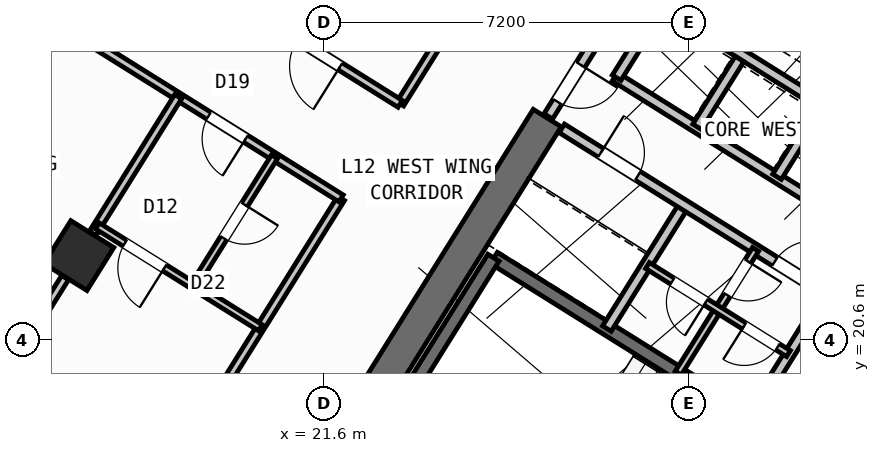
"""IFC4 building model, lengths in metres.
Left out: names, types, materials, properties, quantities, classifications, styles, units other than length and angle.
Written with IfcOpenShell. Run it as: python <this file> out.ifc"""

import sys

from ifc_helpers import new_model, si_unit, direction, frame, frame_2d, origin, origin_2d, place, context, subcontext, project, spatial, rectangle, hollow_rectangle, extrude, source, transform, mapped, element, fill, save


model = new_model("IFC4")
c1 = context("Model", 3, precision=1e-05, world=origin(), true_north=direction((0.0, 1.0)))
c2 = subcontext(c1, "Body", "Model", "MODEL_VIEW")
j1 = project(units=[si_unit("LENGTHUNIT", "METRE"), si_unit("PLANEANGLEUNIT", "RADIAN")], contexts=[c1])
p1 = place(None, origin())
s1 = spatial("IfcSite", under=j1, at=p1, CompositionType="ELEMENT")
p2 = place(p1, origin())
s2 = spatial("IfcBuilding", under=s1, at=p2, CompositionType="ELEMENT")
p3 = place(p2, frame((0.0, 0.0, 49.2)))
s3 = spatial("IfcBuildingStorey", under=s2, at=p3, CompositionType="ELEMENT", Elevation=49.2)
p4 = place(p3, frame((40.615, 23.983, 0.0), z_axis=(0.0, 0.0, 1.0), x_axis=(-0.848045953968, 0.529922692436, 0.0)))
e1 = element("IfcWall", 1, at=p4, inside=s3, PredefinedType="SHEAR", context=c2, shape_type="SweptSolid", body=[
    extrude(rectangle(XDim=13.24, YDim=0.65, at=frame_2d((6.62, 0.0))), origin(), (0.0, 0.0, 1.0), 3.35),
])
p5 = place(p3, frame((26.007, 24.976, 0.0), z_axis=(0.0, 0.0, 1.0), x_axis=(-0.529916319127, -0.848049936456, 0.0)))
e2 = element("IfcWall", 2, at=p5, inside=s3, PredefinedType="SHEAR", context=c2, shape_type="SweptSolid", body=[
    extrude(rectangle(XDim=6.375, YDim=0.65, at=frame_2d((3.188, 0.0))), origin(), (0.0, 0.0, 1.0), 3.35),
])
m1 = source(origin(), c2, "Body", "SweptSolid", [
    extrude(hollow_rectangle(XDim=1.0, YDim=1.0, WallThickness=0.04, at=origin_2d()), origin(), (0.0, 0.0, 1.0), 3.6),
])
p6 = place(p3, frame((16.764, 22.261, 0.0), z_axis=(0.0, 0.0, 1.0), x_axis=(-0.848048096156, 0.529919264233, 0.0)))
e3 = element("IfcColumn", 3, at=p6, inside=s3, PredefinedType="COLUMN", context=c2, shape_type="MappedRepresentation", body=[
    mapped(m1, transform((0.0, 0.0, 0.0), scale=1.0)),
])
p7 = place(p3, frame((29.268, 6.429, 0.0), z_axis=(0.0, 0.0, 1.0), x_axis=(-0.848049971435, 0.529916263149, 0.0)))
e4 = element("IfcWall", 4, at=p7, inside=s3, PredefinedType="STANDARD", context=c2, shape_type="SweptSolid", body=[
    extrude(rectangle(XDim=31.588, YDim=0.32, at=frame_2d((15.794, 0.0))), origin(), (0.0, 0.0, 1.0), 3.35),
])
p8 = place(p7, frame((16.362, 0.0, 0.0)))
e5 = element("IfcOpeningElement", 5, at=p8, cuts=e4, PredefinedType="OPENING", context=c2, shape_type="SweptSolid", body=[
    extrude(rectangle(XDim=1.2, YDim=2.15, at=frame_2d((0.6, 1.075))), frame((0.0, 0.17, 0.0), z_axis=(0.0, -1.0, 0.0), x_axis=(1.0, 0.0, 0.0)), (0.0, 0.0, 1.0), 0.34),
])
p9 = place(p7, frame((2.989, 0.0, 0.8)))
e6 = element("IfcOpeningElement", 6, at=p9, cuts=e4, PredefinedType="OPENING", context=c2, shape_type="SweptSolid", body=[
    extrude(rectangle(XDim=2.1, YDim=1.55, at=frame_2d((1.05, 0.775))), frame((0.0, 0.17, 0.0), z_axis=(0.0, -1.0, 0.0), x_axis=(1.0, 0.0, 0.0)), (0.0, 0.0, 1.0), 0.34),
])
p10 = place(p7, frame((8.359, 0.0, 0.8)))
e7 = element("IfcOpeningElement", 7, at=p10, cuts=e4, PredefinedType="OPENING", context=c2, shape_type="SweptSolid", body=[
    extrude(rectangle(XDim=2.1, YDim=1.55, at=frame_2d((1.05, 0.775))), frame((0.0, 0.17, 0.0), z_axis=(0.0, -1.0, 0.0), x_axis=(1.0, 0.0, 0.0)), (0.0, 0.0, 1.0), 0.34),
])
p11 = place(p7, frame((13.284, 0.0, 0.95)))
e8 = element("IfcOpeningElement", 8, at=p11, cuts=e4, PredefinedType="OPENING", context=c2, shape_type="SweptSolid", body=[
    extrude(rectangle(XDim=1.2, YDim=1.4, at=frame_2d((0.6, 0.7))), frame((0.0, 0.17, 0.0), z_axis=(0.0, -1.0, 0.0), x_axis=(1.0, 0.0, 0.0)), (0.0, 0.0, 1.0), 0.34),
])
p12 = place(p7, frame((20.259, 0.0, 0.95)))
e9 = element("IfcOpeningElement", 9, at=p12, cuts=e4, PredefinedType="OPENING", context=c2, shape_type="SweptSolid", body=[
    extrude(rectangle(XDim=1.2, YDim=1.4, at=frame_2d((0.6, 0.7))), frame((0.0, 0.17, 0.0), z_axis=(0.0, -1.0, 0.0), x_axis=(1.0, 0.0, 0.0)), (0.0, 0.0, 1.0), 0.34),
])
p13 = place(p7, frame((22.929, 0.0, 0.95)))
e10 = element("IfcOpeningElement", 10, at=p13, cuts=e4, PredefinedType="OPENING", context=c2, shape_type="SweptSolid", body=[
    extrude(rectangle(XDim=1.2, YDim=1.4, at=frame_2d((0.6, 0.7))), frame((0.0, 0.17, 0.0), z_axis=(0.0, -1.0, 0.0), x_axis=(1.0, 0.0, 0.0)), (0.0, 0.0, 1.0), 0.34),
])
p14 = place(p7, frame((26.106, 0.0, 0.85)))
e11 = element("IfcOpeningElement", 11, at=p14, cuts=e4, PredefinedType="OPENING", context=c2, shape_type="SweptSolid", body=[
    extrude(rectangle(XDim=1.5, YDim=1.5, at=frame_2d((0.75, 0.75))), frame((0.0, 0.17, 0.0), z_axis=(0.0, -1.0, 0.0), x_axis=(1.0, 0.0, 0.0)), (0.0, 0.0, 1.0), 0.34),
])
p15 = place(p7, frame((29.068, 0.0, 0.85)))
e12 = element("IfcOpeningElement", 12, at=p15, cuts=e4, PredefinedType="OPENING", context=c2, shape_type="SweptSolid", body=[
    extrude(rectangle(XDim=1.8, YDim=1.5, at=frame_2d((0.9, 0.75))), frame((0.0, 0.17, 0.0), z_axis=(0.0, -1.0, 0.0), x_axis=(1.0, 0.0, 0.0)), (0.0, 0.0, 1.0), 0.34),
])
p16 = place(p3, frame((14.138, 41.825, 0.0), z_axis=(0.0, 0.0, 1.0), x_axis=(0.848046498049, -0.529921821731, 0.0)))
e13 = element("IfcWall", 13, at=p16, inside=s3, PredefinedType="STANDARD", context=c2, shape_type="SweptSolid", body=[
    extrude(rectangle(XDim=31.588, YDim=0.32, at=frame_2d((15.794, 0.0))), origin(), (0.0, 0.0, 1.0), 3.35),
])
p17 = place(p16, frame((3.159, 0.0, 0.0)))
e14 = element("IfcOpeningElement", 14, at=p17, cuts=e13, PredefinedType="OPENING", context=c2, shape_type="SweptSolid", body=[
    extrude(rectangle(XDim=1.05, YDim=2.15, at=frame_2d((0.525, 1.075))), frame((0.0, 0.17, 0.0), z_axis=(0.0, -1.0, 0.0), x_axis=(1.0, 0.0, 0.0)), (0.0, 0.0, 1.0), 0.34),
])
p18 = place(p16, frame((0.906, 0.0, 1.0)))
e15 = element("IfcOpeningElement", 15, at=p18, cuts=e13, PredefinedType="OPENING", context=c2, shape_type="SweptSolid", body=[
    extrude(rectangle(XDim=0.9, YDim=1.25, at=frame_2d((0.45, 0.625))), frame((0.0, 0.17, 0.0), z_axis=(0.0, -1.0, 0.0), x_axis=(1.0, 0.0, 0.0)), (0.0, 0.0, 1.0), 0.34),
])
p19 = place(p16, frame((9.537, 0.0, 0.85)))
e16 = element("IfcOpeningElement", 16, at=p19, cuts=e13, PredefinedType="OPENING", context=c2, shape_type="SweptSolid", body=[
    extrude(rectangle(XDim=1.8, YDim=1.5, at=frame_2d((0.9, 0.75))), frame((0.0, 0.17, 0.0), z_axis=(0.0, -1.0, 0.0), x_axis=(1.0, 0.0, 0.0)), (0.0, 0.0, 1.0), 0.34),
])
p20 = place(p16, frame((13.899, 0.0, 0.85)))
e17 = element("IfcOpeningElement", 17, at=p20, cuts=e13, PredefinedType="OPENING", context=c2, shape_type="SweptSolid", body=[
    extrude(rectangle(XDim=1.5, YDim=1.5, at=frame_2d((0.75, 0.75))), frame((0.0, 0.17, 0.0), z_axis=(0.0, -1.0, 0.0), x_axis=(1.0, 0.0, 0.0)), (0.0, 0.0, 1.0), 0.34),
])
p21 = place(p16, frame((22.019, 0.0, 0.95)))
e18 = element("IfcOpeningElement", 18, at=p21, cuts=e13, PredefinedType="OPENING", context=c2, shape_type="SweptSolid", body=[
    extrude(rectangle(XDim=1.2, YDim=1.4, at=frame_2d((0.6, 0.7))), frame((0.0, 0.17, 0.0), z_axis=(0.0, -1.0, 0.0), x_axis=(1.0, 0.0, 0.0)), (0.0, 0.0, 1.0), 0.34),
])
p22 = place(p16, frame((27.569, 0.0, 0.95)))
e19 = element("IfcOpeningElement", 19, at=p22, cuts=e13, PredefinedType="OPENING", context=c2, shape_type="SweptSolid", body=[
    extrude(rectangle(XDim=1.2, YDim=1.4, at=frame_2d((0.6, 0.7))), frame((0.0, 0.17, 0.0), z_axis=(0.0, -1.0, 0.0), x_axis=(1.0, 0.0, 0.0)), (0.0, 0.0, 1.0), 0.34),
])
p23 = place(p3, frame((31.28, 18.261, 0.0), z_axis=(0.0, 0.0, 1.0), x_axis=(-0.848051618787, 0.529913626805, 0.0)))
e20 = element("IfcWall", 20, at=p23, inside=s3, PredefinedType="SHEAR", context=c2, shape_type="SweptSolid", body=[
    extrude(rectangle(XDim=7.46, YDim=0.26, at=frame_2d((3.73, 0.0))), origin(), (0.0, 0.0, 1.0), 3.35),
])
p24 = place(p23, frame((0.36, 0.0, 0.0)))
e21 = element("IfcOpeningElement", 21, at=p24, cuts=e20, PredefinedType="OPENING", context=c2, shape_type="SweptSolid", body=[
    extrude(rectangle(XDim=0.86, YDim=2.05, at=frame_2d((0.43, 1.025))), frame((0.0, 0.14, 0.0), z_axis=(0.0, -1.0, 0.0), x_axis=(1.0, 0.0, 0.0)), (0.0, 0.0, 1.0), 0.28),
])
p25 = place(p3, frame((24.945, 22.22, 0.0), z_axis=(0.0, 0.0, 1.0), x_axis=(-0.529908658664, -0.84805472316, 0.0)))
e22 = element("IfcWall", 22, at=p25, inside=s3, PredefinedType="SHEAR", context=c2, shape_type="SweptSolid", body=[
    extrude(rectangle(XDim=3.16, YDim=0.26, at=frame_2d((1.58, 0.0))), origin(), (0.0, 0.0, 1.0), 3.35),
])
p26 = place(p3, frame((31.822, 24.998, 0.0), z_axis=(0.0, 0.0, 1.0), x_axis=(-0.848058348634, 0.529902856485, 0.0)))
e23 = element("IfcWall", 23, at=p26, inside=s3, PredefinedType="STANDARD", context=c2, shape_type="SweptSolid", body=[
    extrude(rectangle(XDim=4.568, YDim=0.2, at=frame_2d((2.284, 0.0))), origin(), (0.0, 0.0, 1.0), 3.34),
])
p27 = place(p3, frame((32.108, 22.814, 0.0), z_axis=(0.0, 0.0, 1.0), x_axis=(-0.848042229521, 0.529928652696, 0.0)))
e24 = element("IfcWall", 24, at=p27, inside=s3, PredefinedType="STANDARD", context=c2, shape_type="SweptSolid", body=[
    extrude(rectangle(XDim=5.62, YDim=0.2, at=frame_2d((2.81, 0.0))), origin(), (0.0, 0.0, 1.0), 3.34),
])
p28 = place(p3, frame((28.25, 27.17, 0.0), z_axis=(0.0, 0.0, 1.0), x_axis=(-0.529905827651, -0.848056492117, 0.0)))
e25 = element("IfcWall", 25, at=p28, inside=s3, PredefinedType="STANDARD", context=c2, shape_type="SweptSolid", body=[
    extrude(rectangle(XDim=1.65, YDim=0.2, at=frame_2d((0.825, 0.0))), origin(), (0.0, 0.0, 1.0), 3.34),
])
for number, where, z_axis, x_axis in (
    (26, (31.379, 25.156, 0.0), (0.0, 0.0, 1.0), (-0.53, -0.848, 0.0)),
    (27, (29.801, 26.142, 0.0), (0.0, 0.0, 1.0), (-0.53, -0.848, 0.0)),
):
    element("IfcWall", number, at=place(p3, frame(where, z_axis=z_axis, x_axis=x_axis)), inside=s3, PredefinedType="STANDARD", context=c2, shape_type="SweptSolid", body=[
        extrude(rectangle(XDim=1.58, YDim=0.2, at=frame_2d((0.79, 0.0))), origin(), (0.0, 0.0, 1.0), 3.34),
    ])
for number, where, z_axis, x_axis in (
    (28, (31.525, 21.504, 0.0), (0.0, 0.0, 1.0), (-0.53, -0.848, 0.0)),
    (29, (28.71, 23.263, 0.0), (0.0, 0.0, 1.0), (-0.53, -0.848, 0.0)),
):
    element("IfcWall", number, at=place(p3, frame(where, z_axis=z_axis, x_axis=x_axis)), inside=s3, PredefinedType="STANDARD", context=c2, shape_type="SweptSolid", body=[
        extrude(rectangle(XDim=2.88, YDim=0.2, at=frame_2d((1.44, 0.0))), origin(), (0.0, 0.0, 1.0), 3.34),
    ])
p29 = place(p3, frame((31.525, 21.504, 0.0), z_axis=(0.0, 0.0, 1.0), x_axis=(-0.848044998614, 0.529924221305, 0.0)))
e30 = element("IfcWall", 30, at=p29, inside=s3, PredefinedType="STANDARD", context=c2, shape_type="SweptSolid", body=[
    extrude(rectangle(XDim=6.168, YDim=0.2, at=frame_2d((3.084, 0.0))), origin(), (0.0, 0.0, 1.0), 3.34),
])
p30 = place(p29, frame((4.4, 0.0, 0.0)))
e31 = element("IfcOpeningElement", 31, at=p30, cuts=e30, PredefinedType="OPENING", context=c2, shape_type="SweptSolid", body=[
    extrude(rectangle(XDim=0.86, YDim=2.05, at=frame_2d((0.43, 1.025))), frame((0.0, 0.11, 0.0), z_axis=(0.0, -1.0, 0.0), x_axis=(1.0, 0.0, 0.0)), (0.0, 0.0, 1.0), 0.22),
])
p31 = place(p29, frame((0.35, 0.0, 0.0)))
e32 = element("IfcOpeningElement", 32, at=p31, cuts=e30, PredefinedType="OPENING", context=c2, shape_type="SweptSolid", body=[
    extrude(rectangle(XDim=0.86, YDim=2.05, at=frame_2d((0.43, 1.025))), frame((0.0, 0.11, 0.0), z_axis=(0.0, -1.0, 0.0), x_axis=(1.0, 0.0, 0.0)), (0.0, 0.0, 1.0), 0.22),
])
p32 = place(p3, frame((30.117, 22.384, 0.0), z_axis=(0.0, 0.0, 1.0), x_axis=(-0.529951914384, -0.848027693204, 0.0)))
e33 = element("IfcWall", 33, at=p32, inside=s3, PredefinedType="PLUMBINGWALL", context=c2, shape_type="SweptSolid", body=[
    extrude(rectangle(XDim=1.4, YDim=0.14, at=frame_2d((0.7, 0.0))), origin(), (0.0, 0.0, 1.0), 3.34),
])
p33 = place(p32, frame((0.28, 0.0, 0.0)))
e34 = element("IfcOpeningElement", 34, at=p33, cuts=e33, PredefinedType="OPENING", context=c2, shape_type="SweptSolid", body=[
    extrude(rectangle(XDim=0.78, YDim=2.05, at=frame_2d((0.39, 1.025))), frame((0.0, 0.08, 0.0), z_axis=(0.0, -1.0, 0.0), x_axis=(1.0, 0.0, 0.0)), (0.0, 0.0, 1.0), 0.16),
])
p34 = place(p3, frame((29.375, 21.196, 0.0), z_axis=(0.0, 0.0, 1.0), x_axis=(-0.529865479138, -0.848081702443, 0.0)))
e35 = element("IfcWall", 35, at=p34, inside=s3, PredefinedType="PLUMBINGWALL", context=c2, shape_type="SweptSolid", body=[
    extrude(rectangle(XDim=1.48, YDim=0.14, at=frame_2d((0.74, 0.0))), origin(), (0.0, 0.0, 1.0), 3.34),
])
p35 = place(p3, frame((30.766, 20.327, 0.0), z_axis=(0.0, 0.0, 1.0), x_axis=(-0.848052663127, 0.529911955482, 0.0)))
e36 = element("IfcWall", 36, at=p35, inside=s3, PredefinedType="PLUMBINGWALL", context=c2, shape_type="SweptSolid", body=[
    extrude(rectangle(XDim=3.28, YDim=0.14, at=frame_2d((1.64, 0.0))), origin(), (0.0, 0.0, 1.0), 3.34),
])
p36 = place(p35, frame((0.25, 0.0, 0.0)))
e37 = element("IfcOpeningElement", 37, at=p36, cuts=e36, PredefinedType="OPENING", context=c2, shape_type="SweptSolid", body=[
    extrude(rectangle(XDim=0.78, YDim=2.05, at=frame_2d((0.39, 1.025))), frame((0.0, 0.08, 0.0), z_axis=(0.0, -1.0, 0.0), x_axis=(1.0, 0.0, 0.0)), (0.0, 0.0, 1.0), 0.16),
])
p37 = place(p35, frame((1.92, 0.0, 0.0)))
e38 = element("IfcOpeningElement", 38, at=p37, cuts=e36, PredefinedType="OPENING", context=c2, shape_type="SweptSolid", body=[
    extrude(rectangle(XDim=0.78, YDim=2.05, at=frame_2d((0.39, 1.025))), frame((0.0, 0.08, 0.0), z_axis=(0.0, -1.0, 0.0), x_axis=(1.0, 0.0, 0.0)), (0.0, 0.0, 1.0), 0.16),
])
p38 = place(p3, frame((27.596, 27.52, 0.0), z_axis=(0.0, 0.0, 1.0), x_axis=(-0.529865479138, -0.848081702443, 0.0)))
e39 = element("IfcWall", 39, at=p38, inside=s3, PredefinedType="STANDARD", context=c2, shape_type="SweptSolid", body=[
    extrude(rectangle(XDim=2.96, YDim=0.2, at=frame_2d((1.48, 0.0))), origin(), (0.0, 0.0, 1.0), 3.34),
])
p39 = place(p38, frame((1.76, 0.0, 0.0)))
e40 = element("IfcOpeningElement", 40, at=p39, cuts=e39, PredefinedType="OPENING", context=c2, shape_type="SweptSolid", body=[
    extrude(rectangle(XDim=0.86, YDim=2.05, at=frame_2d((0.43, 1.025))), frame((0.0, 0.11, 0.0), z_axis=(0.0, -1.0, 0.0), x_axis=(1.0, 0.0, 0.0)), (0.0, 0.0, 1.0), 0.22),
])
p40 = place(p3, frame((27.953, 33.016, 0.0), z_axis=(0.0, 0.0, 1.0), x_axis=(-0.529903001606, -0.848058257957, 0.0)))
e41 = element("IfcWall", 41, at=p40, inside=s3, PredefinedType="PARTITIONING", context=c2, shape_type="SweptSolid", body=[
    extrude(rectangle(XDim=9.15, YDim=0.16, at=frame_2d((4.575, 0.0))), origin(), (0.0, 0.0, 1.0), 3.34),
])
p41 = place(p3, frame((21.938, 23.391, 0.0), z_axis=(0.0, 0.0, 1.0), x_axis=(-0.529924725692, -0.848044683434, 0.0)))
e42 = element("IfcWall", 42, at=p41, inside=s3, PredefinedType="PARTITIONING", context=c2, shape_type="SweptSolid", body=[
    extrude(rectangle(XDim=10.35, YDim=0.16, at=frame_2d((5.175, 0.0))), origin(), (0.0, 0.0, 1.0), 3.34),
])
p42 = place(p3, frame((23.104, 25.256, 0.0), z_axis=(0.0, 0.0, 1.0), x_axis=(-0.848041752158, 0.529929416617, 0.0)))
e43 = element("IfcWall", 43, at=p42, inside=s3, PredefinedType="PARTITIONING", context=c2, shape_type="SweptSolid", body=[
    extrude(rectangle(XDim=16.73, YDim=0.16, at=frame_2d((8.365, 0.0))), origin(), (0.0, 0.0, 1.0), 3.34),
])
p43 = place(p42, frame((1.395, 0.0, 0.0)))
e44 = element("IfcOpeningElement", 44, at=p43, cuts=e43, PredefinedType="OPENING", context=c2, shape_type="SweptSolid", body=[
    extrude(rectangle(XDim=1.0, YDim=2.1, at=frame_2d((0.5, 1.05))), frame((0.0, 0.09, 0.0), z_axis=(0.0, -1.0, 0.0), x_axis=(1.0, 0.0, 0.0)), (0.0, 0.0, 1.0), 0.18),
])
p44 = place(p42, frame((7.82, 0.0, 0.0)))
e45 = element("IfcOpeningElement", 45, at=p44, cuts=e43, PredefinedType="OPENING", context=c2, shape_type="SweptSolid", body=[
    extrude(rectangle(XDim=1.0, YDim=2.1, at=frame_2d((0.5, 1.05))), frame((0.0, 0.09, 0.0), z_axis=(0.0, -1.0, 0.0), x_axis=(1.0, 0.0, 0.0)), (0.0, 0.0, 1.0), 0.18),
])
p45 = place(p42, frame((14.76, 0.0, 0.0)))
e46 = element("IfcOpeningElement", 46, at=p45, cuts=e43, PredefinedType="OPENING", context=c2, shape_type="SweptSolid", body=[
    extrude(rectangle(XDim=1.0, YDim=2.1, at=frame_2d((0.5, 1.05))), frame((0.0, 0.09, 0.0), z_axis=(0.0, -1.0, 0.0), x_axis=(1.0, 0.0, 0.0)), (0.0, 0.0, 1.0), 0.18),
])
p46 = place(p3, frame((21.938, 23.391, 0.0), z_axis=(0.0, 0.0, 1.0), x_axis=(-0.848045850158, 0.529922858565, 0.0)))
e47 = element("IfcWall", 47, at=p46, inside=s3, PredefinedType="PARTITIONING", context=c2, shape_type="SweptSolid", body=[
    extrude(rectangle(XDim=16.73, YDim=0.16, at=frame_2d((8.365, 0.0))), origin(), (0.0, 0.0, 1.0), 3.34),
])
p47 = place(p46, frame((2.22, 0.0, 0.0)))
e48 = element("IfcOpeningElement", 48, at=p47, cuts=e47, PredefinedType="OPENING", context=c2, shape_type="SweptSolid", body=[
    extrude(rectangle(XDim=0.86, YDim=2.05, at=frame_2d((0.43, 1.025))), frame((0.0, 0.09, 0.0), z_axis=(0.0, -1.0, 0.0), x_axis=(1.0, 0.0, 0.0)), (0.0, 0.0, 1.0), 0.18),
])
p48 = place(p46, frame((6.49, 0.0, 0.0)))
e49 = element("IfcOpeningElement", 49, at=p48, cuts=e47, PredefinedType="OPENING", context=c2, shape_type="SweptSolid", body=[
    extrude(rectangle(XDim=1.0, YDim=2.1, at=frame_2d((0.5, 1.05))), frame((0.0, 0.09, 0.0), z_axis=(0.0, -1.0, 0.0), x_axis=(1.0, 0.0, 0.0)), (0.0, 0.0, 1.0), 0.18),
])
p49 = place(p46, frame((11.14, 0.0, 0.0)))
e50 = element("IfcOpeningElement", 50, at=p49, cuts=e47, PredefinedType="OPENING", context=c2, shape_type="SweptSolid", body=[
    extrude(rectangle(XDim=1.0, YDim=2.1, at=frame_2d((0.5, 1.05))), frame((0.0, 0.09, 0.0), z_axis=(0.0, -1.0, 0.0), x_axis=(1.0, 0.0, 0.0)), (0.0, 0.0, 1.0), 0.18),
])
p50 = place(p3, frame((18.724, 25.399, 0.0), z_axis=(0.0, 0.0, 1.0), x_axis=(-0.529930102756, -0.848041323399, 0.0)))
e51 = element("IfcWall", 51, at=p50, inside=s3, PredefinedType="PARTITIONING", context=c2, shape_type="SweptSolid", body=[
    extrude(rectangle(XDim=3.188, YDim=0.16, at=frame_2d((1.594, 0.0))), origin(), (0.0, 0.0, 1.0), 2.725),
])
p51 = place(p3, frame((16.492, 21.827, 0.0), z_axis=(0.0, 0.0, 1.0), x_axis=(-0.529904608059, -0.848057254175, 0.0)))
e52 = element("IfcWall", 52, at=p51, inside=s3, PredefinedType="PARTITIONING", context=c2, shape_type="SweptSolid", body=[
    extrude(rectangle(XDim=5.351, YDim=0.16, at=frame_2d((2.675, 0.0))), origin(), (0.0, 0.0, 1.0), 2.725),
])
p52 = place(p3, frame((20.343, 20.838, 0.0), z_axis=(0.0, 0.0, 1.0), x_axis=(-0.848059820872, 0.529900500304, 0.0)))
e53 = element("IfcWall", 53, at=p52, inside=s3, PredefinedType="PLUMBINGWALL", context=c2, shape_type="SweptSolid", body=[
    extrude(rectangle(XDim=3.79, YDim=0.14, at=frame_2d((1.895, 0.0))), origin(), (0.0, 0.0, 1.0), 3.34),
])
p53 = place(p52, frame((2.23, 0.0, 0.0)))
e54 = element("IfcOpeningElement", 54, at=p53, cuts=e53, PredefinedType="OPENING", context=c2, shape_type="SweptSolid", body=[
    extrude(rectangle(XDim=0.92, YDim=2.08, at=frame_2d((0.46, 1.04))), frame((0.0, 0.08, 0.0), z_axis=(0.0, -1.0, 0.0), x_axis=(1.0, 0.0, 0.0)), (0.0, 0.0, 1.0), 0.16),
])
p54 = place(p3, frame((20.624, 24.212, 0.0), z_axis=(0.0, 0.0, 1.0), x_axis=(-0.529940615993, -0.848034753722, 0.0)))
e55 = element("IfcWall", 55, at=p54, inside=s3, PredefinedType="PLUMBINGWALL", context=c2, shape_type="SweptSolid", body=[
    extrude(rectangle(XDim=3.01, YDim=0.14, at=frame_2d((1.505, 0.0))), origin(), (0.0, 0.0, 1.0), 2.995),
])
p55 = place(p54, frame((1.115, 0.0, 0.0)))
e56 = element("IfcOpeningElement", 56, at=p55, cuts=e55, PredefinedType="OPENING", context=c2, shape_type="SweptSolid", body=[
    extrude(rectangle(XDim=0.78, YDim=2.05, at=frame_2d((0.39, 1.025))), frame((0.0, 0.08, 0.0), z_axis=(0.0, -1.0, 0.0), x_axis=(1.0, 0.0, 0.0)), (0.0, 0.0, 1.0), 0.16),
])
m2 = source(origin(), c2, "Body", "SweptSolid", [
    extrude(rectangle(XDim=0.86, YDim=2.05, at=frame_2d((0.43, 1.025))), frame((0.0, 0.025, 0.0), z_axis=(0.0, -1.0, 0.0), x_axis=(1.0, 0.0, 0.0)), (0.0, 0.0, 1.0), 0.05),
])
p56 = place(p30, frame((0.86, 0.0, 0.0), z_axis=(0.0, 0.0, 1.0), x_axis=(-1.0, 0.0, 0.0)))
e57 = element("IfcDoor", 57, at=p56, inside=s3, OperationType="SINGLE_SWING_LEFT", PredefinedType="DOOR", context=c2, shape_type="MappedRepresentation", body=[
    mapped(m2, transform((0.0, 0.0, 0.0), scale=1.0)),
])
fill(e31, e57)
p57 = place(p31, frame((0.86, 0.0, 0.0), z_axis=(0.0, 0.0, 1.0), x_axis=(-1.0, 0.0, 0.0)))
e58 = element("IfcDoor", 58, at=p57, inside=s3, OperationType="SINGLE_SWING_RIGHT", PredefinedType="DOOR", context=c2, shape_type="MappedRepresentation", body=[
    mapped(m2, transform((0.0, 0.0, 0.0), scale=1.0)),
])
fill(e32, e58)
m3 = source(origin(), c2, "Body", "SweptSolid", [
    extrude(rectangle(XDim=0.78, YDim=2.05, at=frame_2d((0.39, 1.025))), frame((0.0, 0.025, 0.0), z_axis=(0.0, -1.0, 0.0), x_axis=(1.0, 0.0, 0.0)), (0.0, 0.0, 1.0), 0.05),
])
p58 = place(p33, origin())
e59 = element("IfcDoor", 59, at=p58, inside=s3, OperationType="SINGLE_SWING_LEFT", PredefinedType="DOOR", context=c2, shape_type="MappedRepresentation", body=[
    mapped(m3, transform((0.0, 0.0, 0.0), scale=1.0)),
])
fill(e34, e59)
p59 = place(p36, origin())
e60 = element("IfcDoor", 60, at=p59, inside=s3, OperationType="SINGLE_SWING_RIGHT", PredefinedType="DOOR", context=c2, shape_type="MappedRepresentation", body=[
    mapped(m3, transform((0.0, 0.0, 0.0), scale=1.0)),
])
fill(e37, e60)
p60 = place(p37, origin())
e61 = element("IfcDoor", 61, at=p60, inside=s3, OperationType="SINGLE_SWING_LEFT", PredefinedType="DOOR", context=c2, shape_type="MappedRepresentation", body=[
    mapped(m3, transform((0.0, 0.0, 0.0), scale=1.0)),
])
fill(e38, e61)
p61 = place(p39, origin())
e62 = element("IfcDoor", 62, at=p61, inside=s3, OperationType="SINGLE_SWING_LEFT", PredefinedType="DOOR", context=c2, shape_type="MappedRepresentation", body=[
    mapped(m2, transform((0.0, 0.0, 0.0), scale=1.0)),
])
fill(e40, e62)
p62 = place(p47, origin())
e63 = element("IfcDoor", 63, at=p62, inside=s3, OperationType="SINGLE_SWING_LEFT", PredefinedType="DOOR", context=c2, shape_type="MappedRepresentation", body=[
    mapped(m2, transform((0.0, 0.0, 0.0), scale=1.0)),
])
fill(e48, e63)
m4 = source(origin(), c2, "Body", "SweptSolid", [
    extrude(rectangle(XDim=0.92, YDim=2.08, at=frame_2d((0.46, 1.04))), frame((0.0, 0.025, 0.0), z_axis=(0.0, -1.0, 0.0), x_axis=(1.0, 0.0, 0.0)), (0.0, 0.0, 1.0), 0.05),
])
p63 = place(p53, origin())
e64 = element("IfcDoor", 64, at=p63, inside=s3, OperationType="SINGLE_SWING_LEFT", PredefinedType="DOOR", context=c2, shape_type="MappedRepresentation", body=[
    mapped(m4, transform((0.0, 0.0, 0.0), scale=1.0)),
])
fill(e54, e64)
p64 = place(p55, origin())
e65 = element("IfcDoor", 65, at=p64, inside=s3, OperationType="SINGLE_SWING_LEFT", PredefinedType="DOOR", context=c2, shape_type="MappedRepresentation", body=[
    mapped(m3, transform((0.0, 0.0, 0.0), scale=1.0)),
])
fill(e56, e65)
m5 = source(origin(), c2, "Body", "SweptSolid", [
    extrude(rectangle(XDim=1.0, YDim=2.1, at=frame_2d((0.5, 1.05))), frame((0.0, 0.025, 0.0), z_axis=(0.0, -1.0, 0.0), x_axis=(1.0, 0.0, 0.0)), (0.0, 0.0, 1.0), 0.05),
])
p65 = place(p43, origin())
e66 = element("IfcDoor", 66, at=p65, inside=s3, OperationType="SINGLE_SWING_LEFT", PredefinedType="DOOR", context=c2, shape_type="MappedRepresentation", body=[
    mapped(m5, transform((0.0, 0.0, 0.0), scale=1.0)),
])
fill(e44, e66)
save(model, sys.argv[1])
